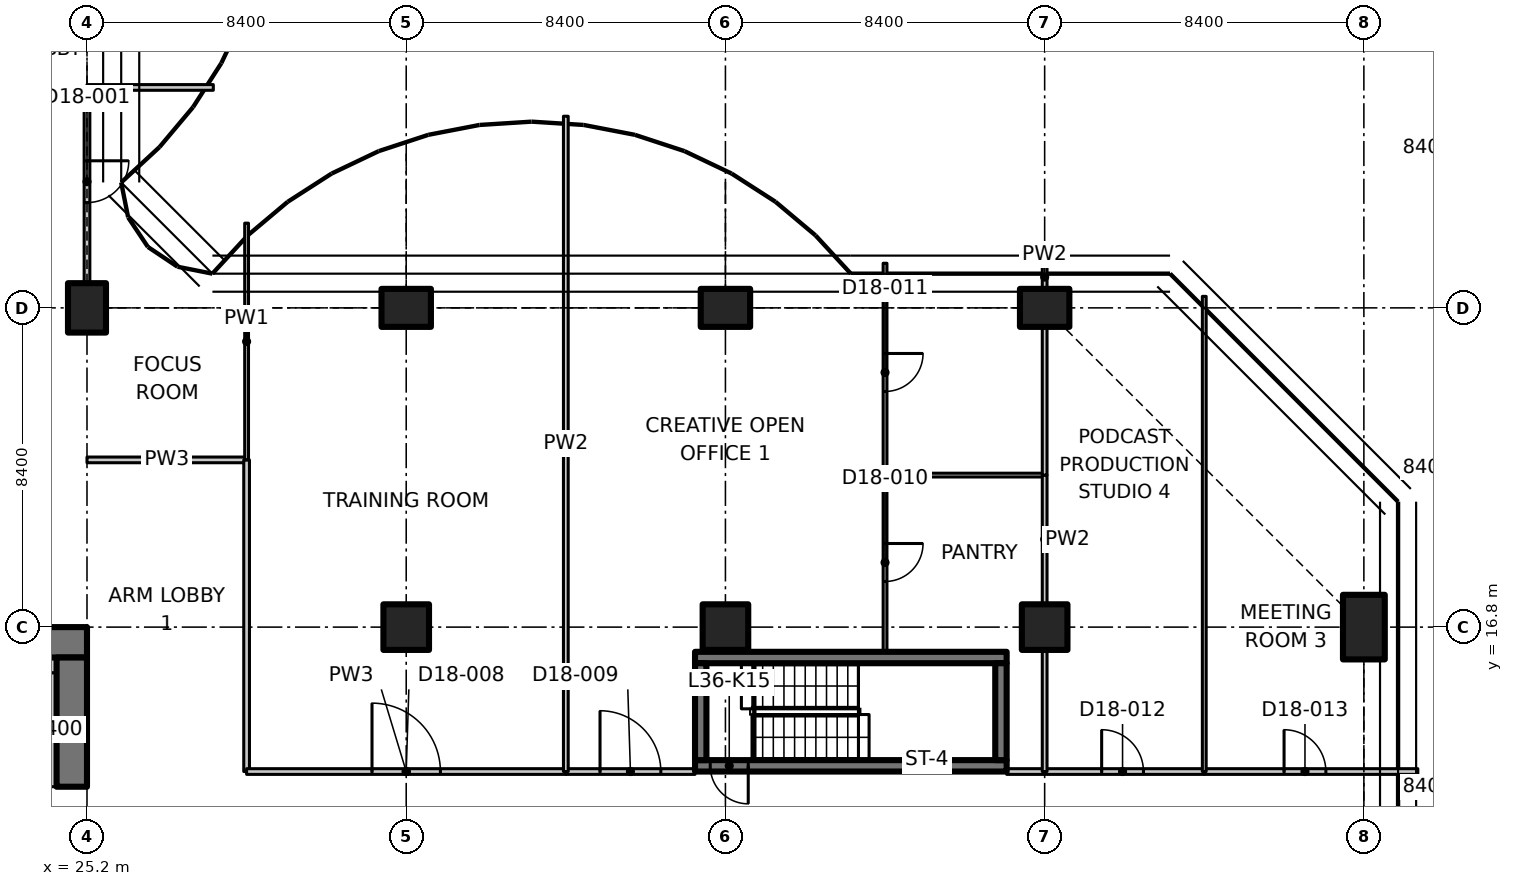
"""IFC4 building model, lengths in metres.
Left out: names, types, materials, properties, quantities, classifications, styles, units other than length and angle.
Written with IfcOpenShell. Run it as: python <this file> out.ifc"""

import sys

from ifc_helpers import new_model, si_unit, direction, frame, frame_2d, origin, origin_2d, place, context, subcontext, project, spatial, polyline, rectangle, outline, extrude, element, fill, save


model = new_model("IFC4")
c1 = context("Model", 3, precision=1e-05, world=origin(), true_north=direction((0.0, 1.0)))
c2 = subcontext(c1, "Body", "Model", "MODEL_VIEW")
j1 = project(units=[si_unit("LENGTHUNIT", "METRE"), si_unit("PLANEANGLEUNIT", "RADIAN")], contexts=[c1])
p1 = place(None, origin())
s1 = spatial("IfcSite", under=j1, at=p1, CompositionType="ELEMENT")
p2 = place(p1, origin())
s2 = spatial("IfcBuilding", under=s1, at=p2, CompositionType="ELEMENT")
p3 = place(p2, frame((0.0, 0.0, 145.7)))
s3 = spatial("IfcBuildingStorey", under=s2, at=p3, CompositionType="ELEMENT", Elevation=145.7)
p4 = place(p3, frame((25.2, 25.2, 0.0), z_axis=(0.0, 0.0, 1.0), x_axis=(1.0, 0.0, 0.0)))
e1 = element("IfcColumn", 1, at=p4, inside=s3, PredefinedType="COLUMN", context=c2, shape_type="SweptSolid", body=[
    extrude(rectangle(XDim=1.0, YDim=1.3, at=origin_2d()), origin(), (0.0, 0.0, 1.0), 3.35),
])
p5 = place(p3, frame((33.6, 16.8, 0.0), z_axis=(0.0, 0.0, 1.0), x_axis=(1.0, 0.0, 0.0)))
e2 = element("IfcColumn", 2, at=p5, inside=s3, PredefinedType="COLUMN", context=c2, shape_type="SweptSolid", body=[
    extrude(rectangle(XDim=1.2, YDim=1.2, at=origin_2d()), origin(), (0.0, 0.0, 1.0), 3.35),
])
p6 = place(p3, frame((33.6, 25.2, 0.0), z_axis=(0.0, 0.0, 1.0), x_axis=(0.0, 1.0, 0.0)))
e3 = element("IfcColumn", 3, at=p6, inside=s3, PredefinedType="COLUMN", context=c2, shape_type="SweptSolid", body=[
    extrude(rectangle(XDim=1.0, YDim=1.3, at=origin_2d()), origin(), (0.0, 0.0, 1.0), 3.35),
])
p7 = place(p3, frame((42.0, 16.8, 0.0), z_axis=(0.0, 0.0, 1.0), x_axis=(1.0, 0.0, 0.0)))
e4 = element("IfcColumn", 4, at=p7, inside=s3, PredefinedType="COLUMN", context=c2, shape_type="SweptSolid", body=[
    extrude(rectangle(XDim=1.2, YDim=1.2, at=origin_2d()), origin(), (0.0, 0.0, 1.0), 3.35),
])
p8 = place(p3, frame((42.0, 25.2, 0.0), z_axis=(0.0, 0.0, 1.0), x_axis=(0.0, 1.0, 0.0)))
e5 = element("IfcColumn", 5, at=p8, inside=s3, PredefinedType="COLUMN", context=c2, shape_type="SweptSolid", body=[
    extrude(rectangle(XDim=1.0, YDim=1.3, at=origin_2d()), origin(), (0.0, 0.0, 1.0), 3.35),
])
p9 = place(p3, frame((50.4, 16.8, 0.0), z_axis=(0.0, 0.0, 1.0), x_axis=(1.0, 0.0, 0.0)))
e6 = element("IfcColumn", 6, at=p9, inside=s3, PredefinedType="COLUMN", context=c2, shape_type="SweptSolid", body=[
    extrude(rectangle(XDim=1.2, YDim=1.2, at=origin_2d()), origin(), (0.0, 0.0, 1.0), 3.35),
])
p10 = place(p3, frame((50.4, 25.2, 0.0), z_axis=(0.0, 0.0, 1.0), x_axis=(0.0, 1.0, 0.0)))
e7 = element("IfcColumn", 7, at=p10, inside=s3, PredefinedType="COLUMN", context=c2, shape_type="SweptSolid", body=[
    extrude(rectangle(XDim=1.0, YDim=1.3, at=origin_2d()), origin(), (0.0, 0.0, 1.0), 3.35),
])
p11 = place(p3, frame((58.8, 16.8, 0.0), z_axis=(0.0, 0.0, 1.0), x_axis=(1.0, 0.0, 0.0)))
e8 = element("IfcColumn", 8, at=p11, inside=s3, PredefinedType="COLUMN", context=c2, shape_type="SweptSolid", body=[
    extrude(rectangle(XDim=1.1, YDim=1.7, at=origin_2d()), origin(), (0.0, 0.0, 1.0), 3.35),
])
p12 = place(p3, frame((23.8, 16.4, 0.0), z_axis=(0.0, 0.0, 1.0), x_axis=(1.0, 0.0, 0.0)))
e9 = element("IfcWall", 9, at=p12, inside=s3, PredefinedType="SHEAR", context=c2, shape_type="SweptSolid", body=[
    extrude(rectangle(XDim=1.4, YDim=0.8, at=frame_2d((0.7, 0.0))), origin(), (0.0, 0.0, 1.0), 3.35),
])
p13 = place(p3, frame((24.8, 12.6, 0.0), z_axis=(0.0, 0.0, 1.0), x_axis=(0.0, 1.0, 0.0)))
e10 = element("IfcWall", 10, at=p13, inside=s3, PredefinedType="SHEAR", context=c2, shape_type="SweptSolid", body=[
    extrude(rectangle(XDim=3.4, YDim=0.8, at=frame_2d((1.7, 0.0))), origin(), (0.0, 0.0, 1.0), 3.35),
])
p14 = place(p3, frame((24.2, 12.6, 0.0), z_axis=(0.0, 0.0, 1.0), x_axis=(0.0, 1.0, 0.0)))
e11 = element("IfcWall", 11, at=p14, inside=s3, PredefinedType="PARTITIONING", context=c2, shape_type="SweptSolid", body=[
    extrude(rectangle(XDim=3.0, YDim=0.4, at=frame_2d((1.5, 0.0))), origin(), (0.0, 0.0, 1.0), 3.35),
])
p15 = place(p3, frame((23.8, 15.8, 0.0), z_axis=(0.0, 0.0, 1.0), x_axis=(1.0, 0.0, 0.0)))
e12 = element("IfcWall", 12, at=p15, inside=s3, PredefinedType="PARTITIONING", context=c2, shape_type="SweptSolid", body=[
    extrude(rectangle(XDim=0.6, YDim=0.4, at=frame_2d((0.3, 0.0))), origin(), (0.0, 0.0, 1.0), 3.35),
])
p16 = place(p3, frame((49.4, 13.15, 0.0), z_axis=(0.0, 0.0, 1.0), x_axis=(-1.0, 0.0, 0.0)))
e13 = element("IfcWall", 13, at=p16, inside=s3, PredefinedType="SHEAR", context=c2, shape_type="SweptSolid", body=[
    extrude(rectangle(XDim=8.2, YDim=0.3, at=frame_2d((4.1, 0.0))), origin(), (0.0, 0.0, 1.0), 3.35),
])
p17 = place(p16, frame((6.8, 0.0, 0.0)))
e14 = element("IfcOpeningElement", 14, at=p17, cuts=e13, PredefinedType="OPENING", context=c2, shape_type="SweptSolid", body=[
    extrude(rectangle(XDim=1.0, YDim=2.1, at=frame_2d((0.5, 1.05))), frame((0.0, 0.16, 0.0), z_axis=(0.0, -1.0, 0.0), x_axis=(1.0, 0.0, 0.0)), (0.0, 0.0, 1.0), 0.32),
])
p18 = place(p3, frame((41.2, 16.0, 0.0), z_axis=(0.0, 0.0, 1.0), x_axis=(1.0, 0.0, 0.0)))
e15 = element("IfcWall", 15, at=p18, inside=s3, PredefinedType="SHEAR", context=c2, shape_type="SweptSolid", body=[
    extrude(rectangle(XDim=8.2, YDim=0.3, at=frame_2d((4.1, 0.0))), origin(), (0.0, 0.0, 1.0), 3.35),
])
for number, where, z_axis, x_axis in (
    (16, (41.35, 13.3, 0.0), (0.0, 0.0, 1.0), (0.0, 1.0, 0.0)),
    (17, (49.25, 13.3, 0.0), (0.0, 0.0, 1.0), (0.0, 1.0, 0.0)),
):
    element("IfcWall", number, at=place(p3, frame(where, z_axis=z_axis, x_axis=x_axis)), inside=s3, PredefinedType="SHEAR", context=c2, shape_type="SweptSolid", body=[
        extrude(rectangle(XDim=2.55, YDim=0.3, at=frame_2d((1.275, 0.0))), origin(), (0.0, 0.0, 1.0), 3.35),
    ])
p19 = place(p3, frame((25.2, 21.2, 0.0), z_axis=(0.0, 0.0, 1.0), x_axis=(1.0, 0.0, 0.0)))
e18 = element("IfcWall", 18, at=p19, inside=s3, PredefinedType="PARTITIONING", context=c2, shape_type="SweptSolid", body=[
    extrude(rectangle(XDim=4.2, YDim=0.15, at=frame_2d((2.1, 0.0))), origin(), (0.0, 0.0, 1.0), 3.33),
])
p20 = place(p3, frame((29.4, 21.2, 0.0), z_axis=(0.0, 0.0, 1.0), x_axis=(0.0, -1.0, 0.0)))
e19 = element("IfcWall", 19, at=p20, inside=s3, PredefinedType="PARTITIONING", context=c2, shape_type="SweptSolid", body=[
    extrude(rectangle(XDim=8.2, YDim=0.15, at=frame_2d((4.1, 0.0))), origin(), (0.0, 0.0, 1.0), 3.33),
])
p21 = place(p3, frame((29.4, 27.429, 0.0), z_axis=(0.0, 0.0, 1.0), x_axis=(0.0, -1.0, 0.0)))
e20 = element("IfcWall", 20, at=p21, inside=s3, PredefinedType="PARTITIONING", context=c2, shape_type="SweptSolid", body=[
    extrude(outline(polyline([(0.0, 0.0), (6.229, 0.0), (6.229, 3.33), (2.679, 3.33), (2.677, 2.98), (1.781, 2.98), (1.779, 3.33), (0.154, 3.33), (0.0, 3.33), (0.0, 0.0)])), frame((0.0, 0.05, 0.0), z_axis=(0.0, -1.0, 0.0), x_axis=(1.0, 0.0, 0.0)), (0.0, 0.0, 1.0), 0.1),
])
p22 = place(p3, frame((25.2, 31.0, 0.0), z_axis=(0.0, 0.0, 1.0), x_axis=(0.0, -1.0, 0.0)))
e21 = element("IfcWall", 21, at=p22, inside=s3, PredefinedType="PARTITIONING", context=c2, shape_type="SweptSolid", body=[
    extrude(outline(polyline([(0.0, 0.0), (5.13, 0.0), (5.13, 2.98), (0.0, 2.98), (0.0, 0.0)])), frame((0.0, 0.075, 0.0), z_axis=(0.0, -1.0, 0.0), x_axis=(1.0, 0.0, 0.0)), (0.0, 0.0, 1.0), 0.15),
])
p23 = place(p22, frame((1.93, 0.0, 0.0)))
e22 = element("IfcOpeningElement", 22, at=p23, cuts=e21, PredefinedType="OPENING", context=c2, shape_type="SweptSolid", body=[
    extrude(rectangle(XDim=1.1, YDim=2.1, at=frame_2d((0.55, 1.05))), frame((0.0, 0.085, 0.0), z_axis=(0.0, -1.0, 0.0), x_axis=(1.0, 0.0, 0.0)), (0.0, 0.0, 1.0), 0.17),
])
p24 = place(p3, frame((25.2, 31.0, 0.0), z_axis=(0.0, 0.0, 1.0), x_axis=(1.0, 0.0, 0.0)))
e23 = element("IfcWall", 23, at=p24, inside=s3, PredefinedType="PARTITIONING", context=c2, shape_type="SweptSolid", body=[
    extrude(rectangle(XDim=3.324, YDim=0.15, at=frame_2d((1.662, 0.0))), origin(), (0.0, 0.0, 1.0), 2.98),
])
p25 = place(p3, frame((29.4, 13.0, 0.0), z_axis=(0.0, 0.0, 1.0), x_axis=(1.0, 0.0, 0.0)))
e24 = element("IfcWall", 24, at=p25, inside=s3, PredefinedType="PARTITIONING", context=c2, shape_type="SweptSolid", body=[
    extrude(rectangle(XDim=8.4, YDim=0.15, at=frame_2d((4.2, 0.0))), origin(), (0.0, 0.0, 1.0), 3.33),
])
p26 = place(p25, frame((3.3, 0.0, 0.0)))
e25 = element("IfcOpeningElement", 25, at=p26, cuts=e24, PredefinedType="OPENING", context=c2, shape_type="SweptSolid", body=[
    extrude(rectangle(XDim=1.8, YDim=2.1, at=frame_2d((0.9, 1.05))), frame((0.0, 0.085, 0.0), z_axis=(0.0, -1.0, 0.0), x_axis=(1.0, 0.0, 0.0)), (0.0, 0.0, 1.0), 0.17),
])
p27 = place(p3, frame((37.8, 13.0, 0.0), z_axis=(0.0, 0.0, 1.0), x_axis=(1.0, 0.0, 0.0)))
e26 = element("IfcWall", 26, at=p27, inside=s3, PredefinedType="PARTITIONING", context=c2, shape_type="SweptSolid", body=[
    extrude(rectangle(XDim=3.4, YDim=0.15, at=frame_2d((1.7, 0.0))), origin(), (0.0, 0.0, 1.0), 3.33),
])
p28 = place(p27, frame((0.9, 0.0, 0.0)))
e27 = element("IfcOpeningElement", 27, at=p28, cuts=e26, PredefinedType="OPENING", context=c2, shape_type="SweptSolid", body=[
    extrude(rectangle(XDim=1.6, YDim=2.1, at=frame_2d((0.8, 1.05))), frame((0.0, 0.085, 0.0), z_axis=(0.0, -1.0, 0.0), x_axis=(1.0, 0.0, 0.0)), (0.0, 0.0, 1.0), 0.17),
])
p29 = place(p3, frame((49.4, 13.0, 0.0), z_axis=(0.0, 0.0, 1.0), x_axis=(1.0, 0.0, 0.0)))
e28 = element("IfcWall", 28, at=p29, inside=s3, PredefinedType="PARTITIONING", context=c2, shape_type="SweptSolid", body=[
    extrude(rectangle(XDim=1.0, YDim=0.15, at=frame_2d((0.5, 0.0))), origin(), (0.0, 0.0, 1.0), 3.33),
])
p30 = place(p3, frame((50.4, 13.0, 0.0), z_axis=(0.0, 0.0, 1.0), x_axis=(1.0, 0.0, 0.0)))
e29 = element("IfcWall", 29, at=p30, inside=s3, PredefinedType="PARTITIONING", context=c2, shape_type="SweptSolid", body=[
    extrude(rectangle(XDim=4.2, YDim=0.15, at=frame_2d((2.1, 0.0))), origin(), (0.0, 0.0, 1.0), 3.33),
])
p31 = place(p30, frame((1.5, 0.0, 0.0)))
e30 = element("IfcOpeningElement", 30, at=p31, cuts=e29, PredefinedType="OPENING", context=c2, shape_type="SweptSolid", body=[
    extrude(rectangle(XDim=1.1, YDim=2.1, at=frame_2d((0.55, 1.05))), frame((0.0, 0.085, 0.0), z_axis=(0.0, -1.0, 0.0), x_axis=(1.0, 0.0, 0.0)), (0.0, 0.0, 1.0), 0.17),
])
p32 = place(p3, frame((54.6, 13.0, 0.0), z_axis=(0.0, 0.0, 1.0), x_axis=(1.0, 0.0, 0.0)))
e31 = element("IfcWall", 31, at=p32, inside=s3, PredefinedType="PARTITIONING", context=c2, shape_type="SweptSolid", body=[
    extrude(outline(polyline([(0.0, 0.0), (5.619, 0.0), (5.619, 3.33), (5.28, 3.33), (4.65, 3.33), (4.648, 2.98), (3.752, 2.98), (3.75, 3.33), (0.0, 3.33), (0.0, 0.0)])), frame((0.0, 0.075, 0.0), z_axis=(0.0, -1.0, 0.0), x_axis=(1.0, 0.0, 0.0)), (0.0, 0.0, 1.0), 0.15),
])
p33 = place(p32, frame((2.1, 0.0, 0.0)))
e32 = element("IfcOpeningElement", 32, at=p33, cuts=e31, PredefinedType="OPENING", context=c2, shape_type="SweptSolid", body=[
    extrude(rectangle(XDim=1.1, YDim=2.1, at=frame_2d((0.55, 1.05))), frame((0.0, 0.085, 0.0), z_axis=(0.0, -1.0, 0.0), x_axis=(1.0, 0.0, 0.0)), (0.0, 0.0, 1.0), 0.17),
])
p34 = place(p3, frame((37.8, 30.243, 0.0), z_axis=(0.0, 0.0, 1.0), x_axis=(0.0, -1.0, 0.0)))
e33 = element("IfcWall", 33, at=p34, inside=s3, PredefinedType="PARTITIONING", context=c2, shape_type="SweptSolid", body=[
    extrude(outline(polyline([(0.0, 0.0), (17.243, 0.0), (17.243, 3.33), (5.493, 3.33), (5.491, 2.98), (4.595, 2.98), (4.593, 3.33), (0.0, 3.33), (0.0, 0.0)])), frame((0.0, 0.062, 0.0), z_axis=(0.0, -1.0, 0.0), x_axis=(1.0, 0.0, 0.0)), (0.0, 0.0, 1.0), 0.125),
])
p35 = place(p3, frame((46.2, 20.8, 0.0), z_axis=(0.0, 0.0, 1.0), x_axis=(0.0, -1.0, 0.0)))
e34 = element("IfcWall", 34, at=p35, inside=s3, PredefinedType="PARTITIONING", context=c2, shape_type="SweptSolid", body=[
    extrude(rectangle(XDim=4.65, YDim=0.1, at=frame_2d((2.325, 0.0))), origin(), (0.0, 0.0, 1.0), 3.33),
])
p36 = place(p35, frame((1.8, 0.0, 0.0)))
e35 = element("IfcOpeningElement", 35, at=p36, cuts=e34, PredefinedType="OPENING", context=c2, shape_type="SweptSolid", body=[
    extrude(rectangle(XDim=1.0, YDim=2.1, at=frame_2d((0.5, 1.05))), frame((0.0, 0.06, 0.0), z_axis=(0.0, -1.0, 0.0), x_axis=(1.0, 0.0, 0.0)), (0.0, 0.0, 1.0), 0.12),
])
p37 = place(p3, frame((46.2, 26.374, 0.0), z_axis=(0.0, 0.0, 1.0), x_axis=(0.0, -1.0, 0.0)))
e36 = element("IfcWall", 36, at=p37, inside=s3, PredefinedType="PARTITIONING", context=c2, shape_type="SweptSolid", body=[
    extrude(outline(polyline([(0.0, 0.0), (5.574, 0.0), (5.574, 3.33), (1.624, 3.33), (1.622, 2.98), (0.726, 2.98), (0.724, 3.33), (0.074, 3.33), (0.0, 3.33), (0.0, 0.0)])), frame((0.0, 0.05, 0.0), z_axis=(0.0, -1.0, 0.0), x_axis=(1.0, 0.0, 0.0)), (0.0, 0.0, 1.0), 0.1),
])
p38 = place(p37, frame((2.374, 0.0, 0.0)))
e37 = element("IfcOpeningElement", 37, at=p38, cuts=e36, PredefinedType="OPENING", context=c2, shape_type="SweptSolid", body=[
    extrude(rectangle(XDim=1.0, YDim=2.1, at=frame_2d((0.5, 1.05))), frame((0.0, 0.06, 0.0), z_axis=(0.0, -1.0, 0.0), x_axis=(1.0, 0.0, 0.0)), (0.0, 0.0, 1.0), 0.12),
])
p39 = place(p3, frame((46.2, 20.8, 0.0), z_axis=(0.0, 0.0, 1.0), x_axis=(1.0, 0.0, 0.0)))
e38 = element("IfcWall", 38, at=p39, inside=s3, PredefinedType="PARTITIONING", context=c2, shape_type="SweptSolid", body=[
    extrude(rectangle(XDim=4.2, YDim=0.1, at=frame_2d((2.1, 0.0))), origin(), (0.0, 0.0, 1.0), 3.33),
])
p40 = place(p3, frame((50.4, 20.8, 0.0), z_axis=(0.0, 0.0, 1.0), x_axis=(0.0, -1.0, 0.0)))
e39 = element("IfcWall", 39, at=p40, inside=s3, PredefinedType="PARTITIONING", context=c2, shape_type="SweptSolid", body=[
    extrude(rectangle(XDim=3.38, YDim=0.125, at=frame_2d((1.69, 0.0))), origin(), (0.0, 0.0, 1.0), 3.33),
])
p41 = place(p3, frame((50.4, 16.18, 0.0), z_axis=(0.0, 0.0, 1.0), x_axis=(0.0, -1.0, 0.0)))
e40 = element("IfcWall", 40, at=p41, inside=s3, PredefinedType="PARTITIONING", context=c2, shape_type="SweptSolid", body=[
    extrude(rectangle(XDim=3.18, YDim=0.125, at=frame_2d((1.59, 0.0))), origin(), (0.0, 0.0, 1.0), 3.33),
])
p42 = place(p3, frame((50.4, 26.3, 0.0), z_axis=(0.0, 0.0, 1.0), x_axis=(0.0, -1.0, 0.0)))
e41 = element("IfcWall", 41, at=p42, inside=s3, PredefinedType="PARTITIONING", context=c2, shape_type="SweptSolid", body=[
    extrude(rectangle(XDim=0.58, YDim=0.125, at=frame_2d((0.29, 0.0))), origin(), (0.0, 0.0, 1.0), 3.33),
])
p43 = place(p3, frame((50.4, 24.68, 0.0), z_axis=(0.0, 0.0, 1.0), x_axis=(0.0, -1.0, 0.0)))
e42 = element("IfcWall", 42, at=p43, inside=s3, PredefinedType="PARTITIONING", context=c2, shape_type="SweptSolid", body=[
    extrude(rectangle(XDim=3.88, YDim=0.125, at=frame_2d((1.94, 0.0))), origin(), (0.0, 0.0, 1.0), 2.98),
])
p44 = place(p3, frame((54.6, 25.502, 0.0), z_axis=(0.0, 0.0, 1.0), x_axis=(0.0, -1.0, 0.0)))
e43 = element("IfcWall", 43, at=p44, inside=s3, PredefinedType="PARTITIONING", context=c2, shape_type="SweptSolid", body=[
    extrude(outline(polyline([(0.0, 0.0), (12.502, 0.0), (12.502, 3.33), (5.168, 3.33), (5.166, 2.98), (3.839, 2.98), (3.837, 3.33), (0.103, 3.33), (0.0, 3.33), (0.0, 0.0)])), frame((0.0, 0.05, 0.0), z_axis=(0.0, -1.0, 0.0), x_axis=(1.0, 0.0, 0.0)), (0.0, 0.0, 1.0), 0.1),
])
p45 = place(p17, origin())
e44 = element("IfcDoor", 44, at=p45, inside=s3, OperationType="SINGLE_SWING_LEFT", PredefinedType="DOOR", context=c2, shape_type="SweptSolid", body=[
    extrude(rectangle(XDim=1.0, YDim=2.1, at=frame_2d((0.5, 1.05))), frame((0.0, 0.025, 0.0), z_axis=(0.0, -1.0, 0.0), x_axis=(1.0, 0.0, 0.0)), (0.0, 0.0, 1.0), 0.05),
])
fill(e14, e44)
p46 = place(p23, origin())
e45 = element("IfcDoor", 45, at=p46, inside=s3, OperationType="SINGLE_SWING_RIGHT", PredefinedType="DOOR", context=c2, shape_type="SweptSolid", body=[
    extrude(rectangle(XDim=1.1, YDim=2.1, at=frame_2d((0.55, 1.05))), frame((0.0, 0.025, 0.0), z_axis=(0.0, -1.0, 0.0), x_axis=(1.0, 0.0, 0.0)), (0.0, 0.0, 1.0), 0.05),
])
fill(e22, e45)
p47 = place(p26, origin())
e46 = element("IfcDoor", 46, at=p47, inside=s3, OperationType="DOUBLE_DOOR_SINGLE_SWING", PredefinedType="DOOR", context=c2, shape_type="SweptSolid", body=[
    extrude(rectangle(XDim=1.8, YDim=2.1, at=frame_2d((0.9, 1.05))), frame((0.0, 0.025, 0.0), z_axis=(0.0, -1.0, 0.0), x_axis=(1.0, 0.0, 0.0)), (0.0, 0.0, 1.0), 0.05),
])
fill(e25, e46)
p48 = place(p28, origin())
e47 = element("IfcDoor", 47, at=p48, inside=s3, OperationType="DOUBLE_DOOR_SINGLE_SWING", PredefinedType="DOOR", context=c2, shape_type="SweptSolid", body=[
    extrude(rectangle(XDim=1.6, YDim=2.1, at=frame_2d((0.8, 1.05))), frame((0.0, 0.025, 0.0), z_axis=(0.0, -1.0, 0.0), x_axis=(1.0, 0.0, 0.0)), (0.0, 0.0, 1.0), 0.05),
])
fill(e27, e47)
p49 = place(p36, origin())
e48 = element("IfcDoor", 48, at=p49, inside=s3, OperationType="SINGLE_SWING_LEFT", PredefinedType="DOOR", context=c2, shape_type="SweptSolid", body=[
    extrude(rectangle(XDim=1.0, YDim=2.1, at=frame_2d((0.5, 1.05))), frame((0.0, 0.025, 0.0), z_axis=(0.0, -1.0, 0.0), x_axis=(1.0, 0.0, 0.0)), (0.0, 0.0, 1.0), 0.05),
])
fill(e35, e48)
p50 = place(p38, origin())
e49 = element("IfcDoor", 49, at=p50, inside=s3, OperationType="SINGLE_SWING_LEFT", PredefinedType="DOOR", context=c2, shape_type="SweptSolid", body=[
    extrude(rectangle(XDim=1.0, YDim=2.1, at=frame_2d((0.5, 1.05))), frame((0.0, 0.025, 0.0), z_axis=(0.0, -1.0, 0.0), x_axis=(1.0, 0.0, 0.0)), (0.0, 0.0, 1.0), 0.05),
])
fill(e37, e49)
p51 = place(p31, origin())
e50 = element("IfcDoor", 50, at=p51, inside=s3, OperationType="SINGLE_SWING_LEFT", PredefinedType="DOOR", context=c2, shape_type="SweptSolid", body=[
    extrude(rectangle(XDim=1.1, YDim=2.1, at=frame_2d((0.55, 1.05))), frame((0.0, 0.025, 0.0), z_axis=(0.0, -1.0, 0.0), x_axis=(1.0, 0.0, 0.0)), (0.0, 0.0, 1.0), 0.05),
])
fill(e30, e50)
p52 = place(p33, origin())
e51 = element("IfcDoor", 51, at=p52, inside=s3, OperationType="SINGLE_SWING_LEFT", PredefinedType="DOOR", context=c2, shape_type="SweptSolid", body=[
    extrude(rectangle(XDim=1.1, YDim=2.1, at=frame_2d((0.55, 1.05))), frame((0.0, 0.025, 0.0), z_axis=(0.0, -1.0, 0.0), x_axis=(1.0, 0.0, 0.0)), (0.0, 0.0, 1.0), 0.05),
])
fill(e32, e51)
save(model, sys.argv[1])
